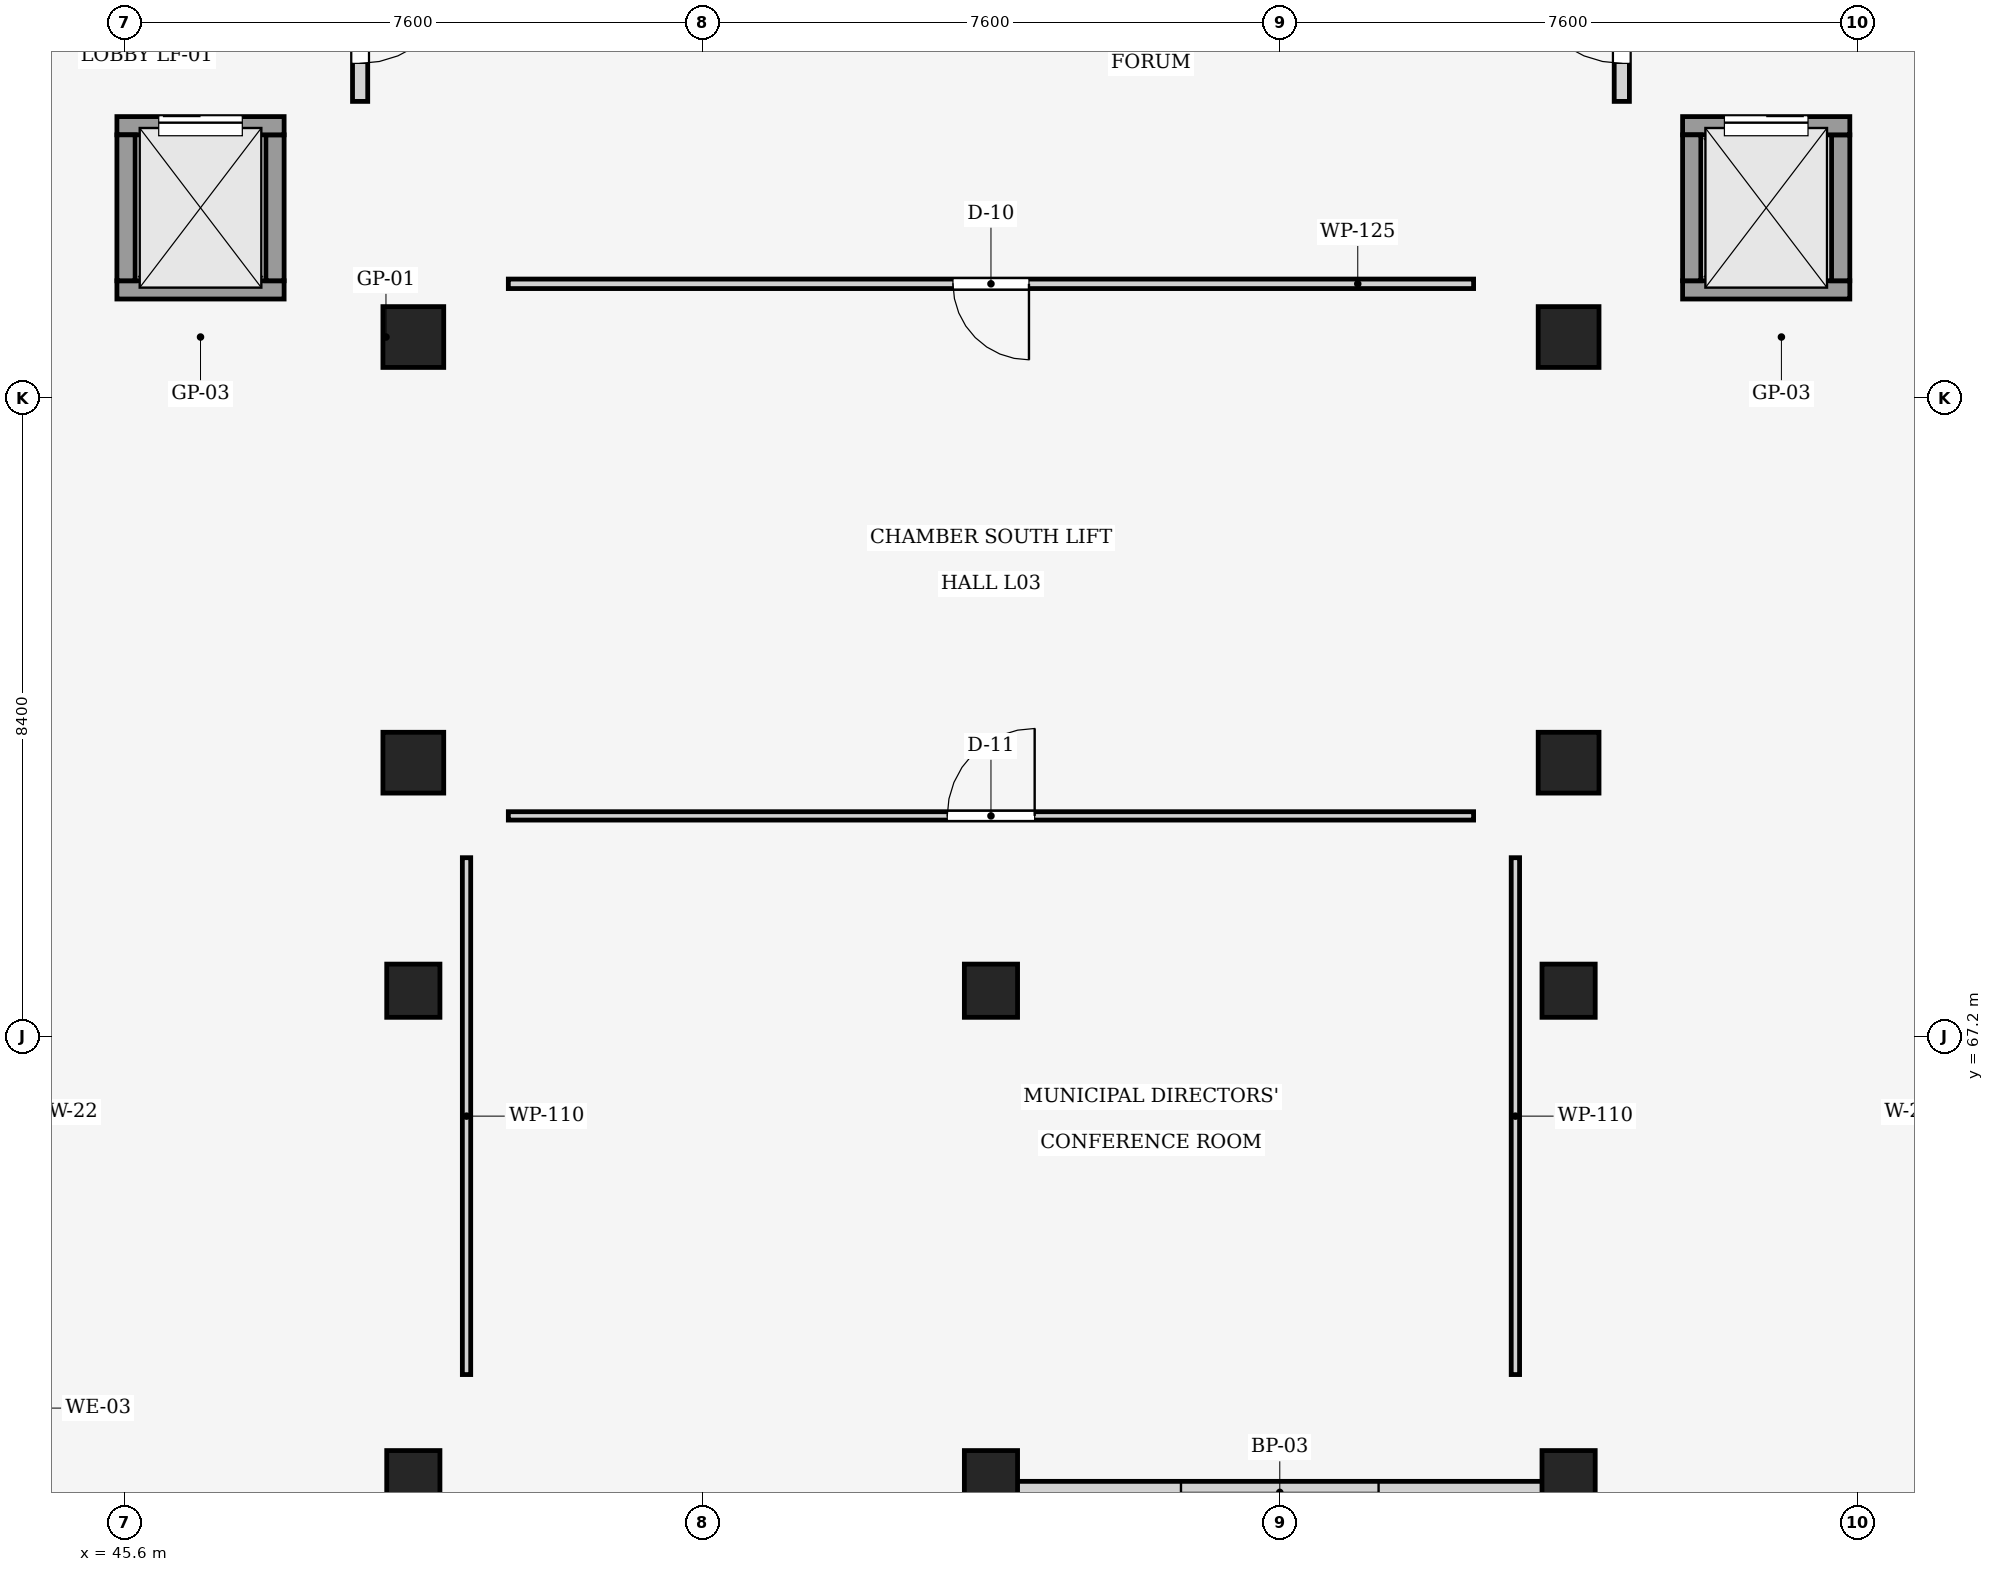
"""IFC4 building model, lengths in metres.
Left out: names, types, materials, properties, quantities, classifications, styles, units other than length and angle.
Written with IfcOpenShell. Run it as: python <this file> out.ifc"""

import sys

from ifc_helpers import new_model, si_unit, direction, frame, frame_2d, origin, origin_2d, place, context, subcontext, project, spatial, rectangle, extrude, element, fill, save


model = new_model("IFC4")
c1 = context("Model", 3, precision=1e-05, world=origin(), true_north=direction((0.0, 1.0)))
c2 = subcontext(c1, "Body", "Model", "MODEL_VIEW")
j1 = project(units=[si_unit("LENGTHUNIT", "METRE"), si_unit("PLANEANGLEUNIT", "RADIAN")], contexts=[c1])
p1 = place(None, origin())
s1 = spatial("IfcSite", under=j1, at=p1, CompositionType="ELEMENT")
p2 = place(p1, origin())
s2 = spatial("IfcBuilding", under=s1, at=p2, CompositionType="ELEMENT")
p3 = place(p2, frame((0.0, 0.0, 13.2)))
s3 = spatial("IfcBuildingStorey", under=s2, at=p3, CompositionType="ELEMENT", Elevation=13.2)
for number, where, z_axis, x_axis in (
    (1, (49.4, 70.8, 0.0), (0.0, 0.0, 1.0), (1.0, 0.0, 0.0)),
    (2, (49.4, 76.4, 0.0), (0.0, 0.0, 1.0), (1.0, 0.0, 0.0)),
    (3, (64.6, 70.8, 0.0), (0.0, 0.0, 1.0), (1.0, 0.0, 0.0)),
    (4, (64.6, 76.4, 0.0), (0.0, 0.0, 1.0), (1.0, 0.0, 0.0)),
):
    element("IfcColumn", number, at=place(p3, frame(where, z_axis=z_axis, x_axis=x_axis)), inside=s3, PredefinedType="COLUMN", context=c2, shape_type="SweptSolid", body=[
        extrude(rectangle(XDim=0.8, YDim=0.8, at=origin_2d()), origin(), (0.0, 0.0, 1.0), 4.05),
    ])
for number, where, z_axis, x_axis in (
    (5, (49.4, 67.8, 0.0), (0.0, 0.0, 1.0), (1.0, 0.0, 0.0)),
    (6, (57.0, 67.8, 0.0), (0.0, 0.0, 1.0), (1.0, 0.0, 0.0)),
    (7, (64.6, 67.8, 0.0), (0.0, 0.0, 1.0), (1.0, 0.0, 0.0)),
    (8, (49.4, 61.4, 0.0), (0.0, 0.0, 1.0), (1.0, 0.0, 0.0)),
    (9, (57.0, 61.4, 0.0), (0.0, 0.0, 1.0), (1.0, 0.0, 0.0)),
    (10, (64.6, 61.4, 0.0), (0.0, 0.0, 1.0), (1.0, 0.0, 0.0)),
):
    element("IfcColumn", number, at=place(p3, frame(where, z_axis=z_axis, x_axis=x_axis)), inside=s3, PredefinedType="COLUMN", context=c2, shape_type="SweptSolid", body=[
        extrude(rectangle(XDim=0.7, YDim=0.7, at=origin_2d()), origin(), (0.0, 0.0, 1.0), 4.05),
    ])
p4 = place(p3, frame((64.315, 61.2, 0.0), z_axis=(0.0, 0.0, 1.0), x_axis=(-1.0, 0.0, 0.0)))
e11 = element("IfcWall", 11, at=p4, inside=s3, PredefinedType="STANDARD", context=c2, shape_type="SweptSolid", body=[
    extrude(rectangle(XDim=7.03, YDim=0.29, at=frame_2d((3.515, 0.0))), origin(), (0.0, 0.0, 1.0), 3.165),
])
p5 = place(p4, frame((2.215, 0.0, 0.85)))
e12 = element("IfcOpeningElement", 12, at=p5, cuts=e11, PredefinedType="OPENING", context=c2, shape_type="SweptSolid", body=[
    extrude(rectangle(XDim=2.6, YDim=1.65, at=frame_2d((1.3, 0.825))), frame((0.0, 0.155, 0.0), z_axis=(0.0, -1.0, 0.0), x_axis=(1.0, 0.0, 0.0)), (0.0, 0.0, 1.0), 0.31),
])
p6 = place(p3, frame((47.7, 77.02, 0.0), z_axis=(0.0, 0.0, 1.0), x_axis=(-1.0, 0.0, 0.0)))
e13 = element("IfcWall", 13, at=p6, inside=s3, PredefinedType="SHEAR", context=c2, shape_type="SweptSolid", body=[
    extrude(rectangle(XDim=2.2, YDim=0.24, at=frame_2d((1.1, 0.0))), origin(), (0.0, 0.0, 1.0), 4.05),
])
p7 = place(p3, frame((47.58, 79.06, 0.0), z_axis=(0.0, 0.0, 1.0), x_axis=(0.0, -1.0, 0.0)))
e14 = element("IfcWall", 14, at=p7, inside=s3, PredefinedType="SHEAR", context=c2, shape_type="SweptSolid", body=[
    extrude(rectangle(XDim=1.92, YDim=0.24, at=frame_2d((0.96, 0.0))), origin(), (0.0, 0.0, 1.0), 4.05),
])
p8 = place(p3, frame((45.5, 79.18, 0.0), z_axis=(0.0, 0.0, 1.0), x_axis=(1.0, 0.0, 0.0)))
e15 = element("IfcWall", 15, at=p8, inside=s3, PredefinedType="SHEAR", context=c2, shape_type="SweptSolid", body=[
    extrude(rectangle(XDim=2.2, YDim=0.24, at=frame_2d((1.1, 0.0))), origin(), (0.0, 0.0, 1.0), 4.05),
])
p9 = place(p8, frame((0.55, 0.0, 0.0)))
e16 = element("IfcOpeningElement", 16, at=p9, cuts=e15, PredefinedType="OPENING", context=c2, shape_type="SweptSolid", body=[
    extrude(rectangle(XDim=1.1, YDim=2.15, at=frame_2d((0.55, 1.075))), frame((0.0, 0.13, 0.0), z_axis=(0.0, -1.0, 0.0), x_axis=(1.0, 0.0, 0.0)), (0.0, 0.0, 1.0), 0.26),
])
p10 = place(p3, frame((45.62, 77.14, 0.0), z_axis=(0.0, 0.0, 1.0), x_axis=(0.0, 1.0, 0.0)))
e17 = element("IfcWall", 17, at=p10, inside=s3, PredefinedType="SHEAR", context=c2, shape_type="SweptSolid", body=[
    extrude(rectangle(XDim=1.92, YDim=0.24, at=frame_2d((0.96, 0.0))), origin(), (0.0, 0.0, 1.0), 4.05),
])
p11 = place(p3, frame((48.7, 81.8, 0.0), z_axis=(0.0, 0.0, 1.0), x_axis=(0.0, -1.0, 0.0)))
e18 = element("IfcWall", 18, at=p11, inside=s3, PredefinedType="PARTITIONING", context=c2, shape_type="SweptSolid", body=[
    extrude(rectangle(XDim=2.3, YDim=0.2, at=frame_2d((1.15, 0.0))), origin(), (0.0, 0.0, 1.0), 2.9),
])
p12 = place(p11, frame((0.5, 0.0, 0.0)))
e19 = element("IfcOpeningElement", 19, at=p12, cuts=e18, PredefinedType="OPENING", context=c2, shape_type="SweptSolid", body=[
    extrude(rectangle(XDim=1.3, YDim=2.2, at=frame_2d((0.65, 1.1))), frame((0.0, 0.11, 0.0), z_axis=(0.0, -1.0, 0.0), x_axis=(1.0, 0.0, 0.0)), (0.0, 0.0, 1.0), 0.22),
])
p13 = place(p3, frame((68.3, 77.02, 0.0), z_axis=(0.0, 0.0, 1.0), x_axis=(-1.0, 0.0, 0.0)))
e20 = element("IfcWall", 20, at=p13, inside=s3, PredefinedType="SHEAR", context=c2, shape_type="SweptSolid", body=[
    extrude(rectangle(XDim=2.2, YDim=0.24, at=frame_2d((1.1, 0.0))), origin(), (0.0, 0.0, 1.0), 4.05),
])
p14 = place(p3, frame((68.18, 79.06, 0.0), z_axis=(0.0, 0.0, 1.0), x_axis=(0.0, -1.0, 0.0)))
e21 = element("IfcWall", 21, at=p14, inside=s3, PredefinedType="SHEAR", context=c2, shape_type="SweptSolid", body=[
    extrude(rectangle(XDim=1.92, YDim=0.24, at=frame_2d((0.96, 0.0))), origin(), (0.0, 0.0, 1.0), 4.05),
])
p15 = place(p3, frame((66.1, 79.18, 0.0), z_axis=(0.0, 0.0, 1.0), x_axis=(1.0, 0.0, 0.0)))
e22 = element("IfcWall", 22, at=p15, inside=s3, PredefinedType="SHEAR", context=c2, shape_type="SweptSolid", body=[
    extrude(rectangle(XDim=2.2, YDim=0.24, at=frame_2d((1.1, 0.0))), origin(), (0.0, 0.0, 1.0), 4.05),
])
p16 = place(p15, frame((0.55, 0.0, 0.0)))
e23 = element("IfcOpeningElement", 23, at=p16, cuts=e22, PredefinedType="OPENING", context=c2, shape_type="SweptSolid", body=[
    extrude(rectangle(XDim=1.1, YDim=2.15, at=frame_2d((0.55, 1.075))), frame((0.0, 0.13, 0.0), z_axis=(0.0, -1.0, 0.0), x_axis=(1.0, 0.0, 0.0)), (0.0, 0.0, 1.0), 0.26),
])
p17 = place(p3, frame((66.22, 77.14, 0.0), z_axis=(0.0, 0.0, 1.0), x_axis=(0.0, 1.0, 0.0)))
e24 = element("IfcWall", 24, at=p17, inside=s3, PredefinedType="SHEAR", context=c2, shape_type="SweptSolid", body=[
    extrude(rectangle(XDim=1.92, YDim=0.24, at=frame_2d((0.96, 0.0))), origin(), (0.0, 0.0, 1.0), 4.05),
])
p18 = place(p3, frame((65.3, 79.5, 0.0), z_axis=(0.0, 0.0, 1.0), x_axis=(0.0, 1.0, 0.0)))
e25 = element("IfcWall", 25, at=p18, inside=s3, PredefinedType="PARTITIONING", context=c2, shape_type="SweptSolid", body=[
    extrude(rectangle(XDim=2.3, YDim=0.2, at=frame_2d((1.15, 0.0))), origin(), (0.0, 0.0, 1.0), 2.9),
])
p19 = place(p18, frame((0.5, 0.0, 0.0)))
e26 = element("IfcOpeningElement", 26, at=p19, cuts=e25, PredefinedType="OPENING", context=c2, shape_type="SweptSolid", body=[
    extrude(rectangle(XDim=1.3, YDim=2.2, at=frame_2d((0.65, 1.1))), frame((0.0, 0.11, 0.0), z_axis=(0.0, -1.0, 0.0), x_axis=(1.0, 0.0, 0.0)), (0.0, 0.0, 1.0), 0.22),
])
p20 = place(p3, frame((63.35, 77.1, 0.0), z_axis=(0.0, 0.0, 1.0), x_axis=(-1.0, 0.0, 0.0)))
e27 = element("IfcWall", 27, at=p20, inside=s3, PredefinedType="PARTITIONING", context=c2, shape_type="SweptSolid", body=[
    extrude(rectangle(XDim=12.7, YDim=0.125, at=frame_2d((6.35, 0.0))), origin(), (0.0, 0.0, 1.0), 3.365),
])
p21 = place(p20, frame((5.85, 0.0, 0.0)))
e28 = element("IfcOpeningElement", 28, at=p21, cuts=e27, PredefinedType="OPENING", context=c2, shape_type="SweptSolid", body=[
    extrude(rectangle(XDim=1.0, YDim=2.22, at=frame_2d((0.5, 1.11))), frame((0.0, 0.073, 0.0), z_axis=(0.0, -1.0, 0.0), x_axis=(1.0, 0.0, 0.0)), (0.0, 0.0, 1.0), 0.145),
])
p22 = place(p3, frame((50.65, 70.1, 0.0), z_axis=(0.0, 0.0, 1.0), x_axis=(1.0, 0.0, 0.0)))
e29 = element("IfcWall", 29, at=p22, inside=s3, PredefinedType="PARTITIONING", context=c2, shape_type="SweptSolid", body=[
    extrude(rectangle(XDim=12.7, YDim=0.11, at=frame_2d((6.35, 0.0))), origin(), (0.0, 0.0, 1.0), 3.7),
])
p23 = place(p22, frame((5.775, 0.0, 0.0)))
e30 = element("IfcOpeningElement", 30, at=p23, cuts=e29, PredefinedType="OPENING", context=c2, shape_type="SweptSolid", body=[
    extrude(rectangle(XDim=1.15, YDim=2.22, at=frame_2d((0.575, 1.11))), frame((0.0, 0.065, 0.0), z_axis=(0.0, -1.0, 0.0), x_axis=(1.0, 0.0, 0.0)), (0.0, 0.0, 1.0), 0.13),
])
for number, where, z_axis, x_axis in (
    (31, (63.9, 69.55, 0.0), (0.0, 0.0, 1.0), (0.0, -1.0, 0.0)),
    (32, (50.1, 62.75, 0.0), (0.0, 0.0, 1.0), (0.0, 1.0, 0.0)),
):
    element("IfcWall", number, at=place(p3, frame(where, z_axis=z_axis, x_axis=x_axis)), inside=s3, PredefinedType="PARTITIONING", context=c2, shape_type="SweptSolid", body=[
        extrude(rectangle(XDim=6.8, YDim=0.11, at=frame_2d((3.4, 0.0))), origin(), (0.0, 0.0, 1.0), 3.165),
    ])
p24 = place(p5, origin())
e33 = element("IfcWindow", 33, at=p24, inside=s3, PartitioningType="SINGLE_PANEL", PredefinedType="WINDOW", context=c2, shape_type="SweptSolid", body=[
    extrude(rectangle(XDim=2.6, YDim=1.65, at=frame_2d((1.3, 0.825))), frame((0.0, 0.03, 0.0), z_axis=(0.0, -1.0, 0.0), x_axis=(1.0, 0.0, 0.0)), (0.0, 0.0, 1.0), 0.06),
])
fill(e12, e33)
p25 = place(p9, origin())
e34 = element("IfcDoor", 34, at=p25, inside=s3, OperationType="SLIDING_TO_LEFT", PredefinedType="DOOR", context=c2, shape_type="SweptSolid", body=[
    extrude(rectangle(XDim=1.1, YDim=2.15, at=frame_2d((0.55, 1.075))), frame((0.0, 0.025, 0.0), z_axis=(0.0, -1.0, 0.0), x_axis=(1.0, 0.0, 0.0)), (0.0, 0.0, 1.0), 0.05),
])
fill(e16, e34)
p26 = place(p12, origin())
e35 = element("IfcDoor", 35, at=p26, inside=s3, OperationType="SINGLE_SWING_LEFT", PredefinedType="DOOR", context=c2, shape_type="SweptSolid", body=[
    extrude(rectangle(XDim=1.3, YDim=2.2, at=frame_2d((0.65, 1.1))), frame((0.0, 0.025, 0.0), z_axis=(0.0, -1.0, 0.0), x_axis=(1.0, 0.0, 0.0)), (0.0, 0.0, 1.0), 0.05),
])
fill(e19, e35)
p27 = place(p16, origin())
e36 = element("IfcDoor", 36, at=p27, inside=s3, OperationType="SLIDING_TO_RIGHT", PredefinedType="DOOR", context=c2, shape_type="SweptSolid", body=[
    extrude(rectangle(XDim=1.1, YDim=2.15, at=frame_2d((0.55, 1.075))), frame((0.0, 0.025, 0.0), z_axis=(0.0, -1.0, 0.0), x_axis=(1.0, 0.0, 0.0)), (0.0, 0.0, 1.0), 0.05),
])
fill(e23, e36)
p28 = place(p19, origin())
e37 = element("IfcDoor", 37, at=p28, inside=s3, OperationType="SINGLE_SWING_RIGHT", PredefinedType="DOOR", context=c2, shape_type="SweptSolid", body=[
    extrude(rectangle(XDim=1.3, YDim=2.2, at=frame_2d((0.65, 1.1))), frame((0.0, 0.025, 0.0), z_axis=(0.0, -1.0, 0.0), x_axis=(1.0, 0.0, 0.0)), (0.0, 0.0, 1.0), 0.05),
])
fill(e26, e37)
p29 = place(p21, origin())
e38 = element("IfcDoor", 38, at=p29, inside=s3, OperationType="SINGLE_SWING_LEFT", PredefinedType="DOOR", context=c2, shape_type="SweptSolid", body=[
    extrude(rectangle(XDim=1.0, YDim=2.22, at=frame_2d((0.5, 1.11))), frame((0.0, 0.025, 0.0), z_axis=(0.0, -1.0, 0.0), x_axis=(1.0, 0.0, 0.0)), (0.0, 0.0, 1.0), 0.05),
])
fill(e28, e38)
p30 = place(p23, origin())
e39 = element("IfcDoor", 39, at=p30, inside=s3, OperationType="SINGLE_SWING_RIGHT", PredefinedType="DOOR", context=c2, shape_type="SweptSolid", body=[
    extrude(rectangle(XDim=1.15, YDim=2.22, at=frame_2d((0.575, 1.11))), frame((0.0, 0.025, 0.0), z_axis=(0.0, -1.0, 0.0), x_axis=(1.0, 0.0, 0.0)), (0.0, 0.0, 1.0), 0.05),
])
fill(e30, e39)
save(model, sys.argv[1])
